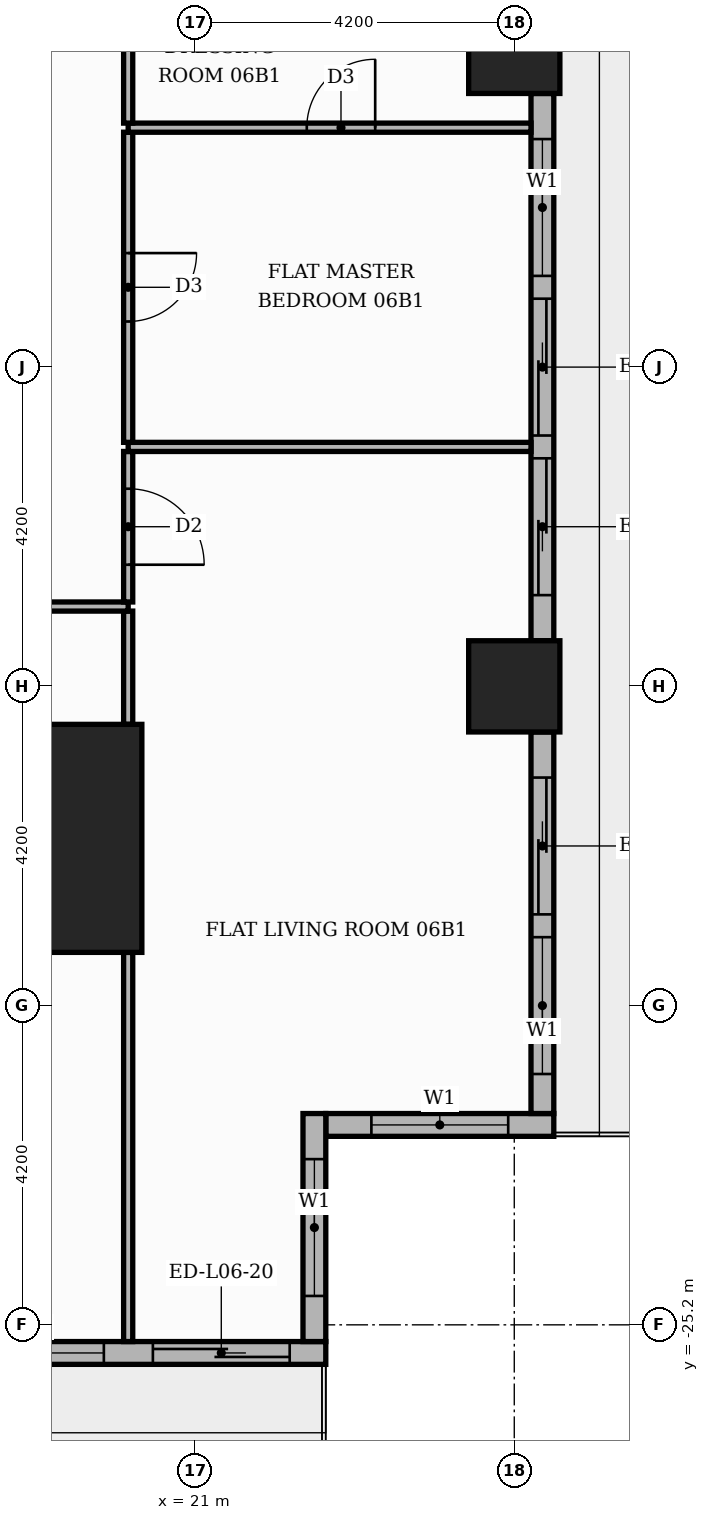
"""IFC4 building model, lengths in metres.
Left out: names, types, materials, properties, quantities, classifications, styles, units other than length and angle.
Written with IfcOpenShell. Run it as: python <this file> out.ifc"""

import sys

from ifc_helpers import new_model, si_unit, direction, frame, frame_2d, origin, origin_2d, place, context, subcontext, project, spatial, rectangle, extrude, element, fill, save


model = new_model("IFC4")
c1 = context("Model", 3, precision=1e-05, world=origin(), true_north=direction((0.0, 1.0)))
c2 = subcontext(c1, "Body", "Model", "MODEL_VIEW")
j1 = project(units=[si_unit("LENGTHUNIT", "METRE"), si_unit("PLANEANGLEUNIT", "RADIAN")], contexts=[c1])
p1 = place(None, origin())
s1 = spatial("IfcSite", under=j1, at=p1, CompositionType="ELEMENT")
p2 = place(p1, origin())
s2 = spatial("IfcBuilding", under=s1, at=p2, CompositionType="ELEMENT")
p3 = place(p2, frame((0.0, 0.0, 30.9)))
s3 = spatial("IfcBuildingStorey", under=s2, at=p3, CompositionType="ELEMENT", Elevation=30.9)
p4 = place(p3, frame((18.8, -18.8, 0.0), z_axis=(0.0, 0.0, 1.0), x_axis=(1.0, 0.0, 0.0)))
e1 = element("IfcColumn", 1, at=p4, inside=s3, PredefinedType="COLUMN", context=c2, shape_type="SweptSolid", body=[
    extrude(rectangle(XDim=3.0, YDim=3.0, at=origin_2d()), origin(), (0.0, 0.0, 1.0), 3.9),
])
for number, where, z_axis, x_axis in (
    (2, (25.2, -8.4, 0.0), (0.0, 0.0, 1.0), (1.0, 0.0, 0.0)),
    (3, (25.2, -16.8, 0.0), (0.0, 0.0, 1.0), (1.0, 0.0, 0.0)),
):
    element("IfcColumn", number, at=place(p3, frame(where, z_axis=z_axis, x_axis=x_axis)), inside=s3, PredefinedType="COLUMN", context=c2, shape_type="SweptSolid", body=[
        extrude(rectangle(XDim=1.2, YDim=1.2, at=origin_2d()), origin(), (0.0, 0.0, 1.0), 3.9),
    ])
p5 = place(p3, frame((22.72, -22.57, 0.0), z_axis=(0.0, 0.0, 1.0), x_axis=(1.0, 0.0, 0.0)))
e4 = element("IfcWall", 4, at=p5, inside=s3, PredefinedType="STANDARD", context=c2, shape_type="SweptSolid", body=[
    extrude(rectangle(XDim=3.0, YDim=0.3, at=frame_2d((1.5, 0.0))), origin(), (0.0, 0.0, 1.0), 3.48),
])
p6 = place(p5, frame((0.6, 0.0, 0.9)))
e5 = element("IfcOpeningElement", 5, at=p6, cuts=e4, PredefinedType="OPENING", context=c2, shape_type="SweptSolid", body=[
    extrude(rectangle(XDim=1.8, YDim=2.1, at=frame_2d((0.9, 1.05))), frame((0.0, 0.16, 0.0), z_axis=(0.0, -1.0, 0.0), x_axis=(1.0, 0.0, 0.0)), (0.0, 0.0, 1.0), 0.32),
])
p7 = place(p3, frame((25.57, -22.42, 0.0), z_axis=(0.0, 0.0, 1.0), x_axis=(0.0, 1.0, 0.0)))
e6 = element("IfcWall", 6, at=p7, inside=s3, PredefinedType="STANDARD", context=c2, shape_type="SweptSolid", body=[
    extrude(rectangle(XDim=5.02, YDim=0.3, at=frame_2d((2.51, 0.0))), origin(), (0.0, 0.0, 1.0), 3.48),
])
p8 = place(p7, frame((0.52, 0.0, 0.9)))
e7 = element("IfcOpeningElement", 7, at=p8, cuts=e6, PredefinedType="OPENING", context=c2, shape_type="SweptSolid", body=[
    extrude(rectangle(XDim=1.8, YDim=2.1, at=frame_2d((0.9, 1.05))), frame((0.0, 0.16, 0.0), z_axis=(0.0, -1.0, 0.0), x_axis=(1.0, 0.0, 0.0)), (0.0, 0.0, 1.0), 0.32),
])
p9 = place(p7, frame((2.62, 0.0, 0.0)))
e8 = element("IfcOpeningElement", 8, at=p9, cuts=e6, PredefinedType="OPENING", context=c2, shape_type="SweptSolid", body=[
    extrude(rectangle(XDim=1.8, YDim=2.4, at=frame_2d((0.9, 1.2))), frame((0.0, 0.16, 0.0), z_axis=(0.0, -1.0, 0.0), x_axis=(1.0, 0.0, 0.0)), (0.0, 0.0, 1.0), 0.32),
])
p10 = place(p3, frame((25.57, -16.2, 0.0), z_axis=(0.0, 0.0, 1.0), x_axis=(0.0, 1.0, 0.0)))
e9 = element("IfcWall", 9, at=p10, inside=s3, PredefinedType="STANDARD", context=c2, shape_type="SweptSolid", body=[
    extrude(rectangle(XDim=7.2, YDim=0.3, at=frame_2d((3.6, 0.0))), origin(), (0.0, 0.0, 1.0), 3.48),
])
p11 = place(p10, frame((0.6, 0.0, 0.0)))
e10 = element("IfcOpeningElement", 10, at=p11, cuts=e9, PredefinedType="OPENING", context=c2, shape_type="SweptSolid", body=[
    extrude(rectangle(XDim=1.8, YDim=2.4, at=frame_2d((0.9, 1.2))), frame((0.0, 0.16, 0.0), z_axis=(0.0, -1.0, 0.0), x_axis=(1.0, 0.0, 0.0)), (0.0, 0.0, 1.0), 0.32),
])
p12 = place(p10, frame((2.7, 0.0, 0.0)))
e11 = element("IfcOpeningElement", 11, at=p12, cuts=e9, PredefinedType="OPENING", context=c2, shape_type="SweptSolid", body=[
    extrude(rectangle(XDim=1.8, YDim=2.4, at=frame_2d((0.9, 1.2))), frame((0.0, 0.16, 0.0), z_axis=(0.0, -1.0, 0.0), x_axis=(1.0, 0.0, 0.0)), (0.0, 0.0, 1.0), 0.32),
])
p13 = place(p10, frame((4.8, 0.0, 0.9)))
e12 = element("IfcOpeningElement", 12, at=p13, cuts=e9, PredefinedType="OPENING", context=c2, shape_type="SweptSolid", body=[
    extrude(rectangle(XDim=1.8, YDim=2.1, at=frame_2d((0.9, 1.05))), frame((0.0, 0.16, 0.0), z_axis=(0.0, -1.0, 0.0), x_axis=(1.0, 0.0, 0.0)), (0.0, 0.0, 1.0), 0.32),
])
p14 = place(p3, frame((17.4, -25.57, 0.0), z_axis=(0.0, 0.0, 1.0), x_axis=(1.0, 0.0, 0.0)))
e13 = element("IfcWall", 13, at=p14, inside=s3, PredefinedType="STANDARD", context=c2, shape_type="SweptSolid", body=[
    extrude(rectangle(XDim=5.32, YDim=0.3, at=frame_2d((2.66, 0.0))), origin(), (0.0, 0.0, 1.0), 3.48),
])
p15 = place(p14, frame((0.6, 0.0, 0.9)))
e14 = element("IfcOpeningElement", 14, at=p15, cuts=e13, PredefinedType="OPENING", context=c2, shape_type="SweptSolid", body=[
    extrude(rectangle(XDim=1.8, YDim=2.1, at=frame_2d((0.9, 1.05))), frame((0.0, 0.16, 0.0), z_axis=(0.0, -1.0, 0.0), x_axis=(1.0, 0.0, 0.0)), (0.0, 0.0, 1.0), 0.32),
])
p16 = place(p14, frame((3.045, 0.0, 0.0)))
e15 = element("IfcOpeningElement", 15, at=p16, cuts=e13, PredefinedType="OPENING", context=c2, shape_type="SweptSolid", body=[
    extrude(rectangle(XDim=1.8, YDim=2.4, at=frame_2d((0.9, 1.2))), frame((0.0, 0.16, 0.0), z_axis=(0.0, -1.0, 0.0), x_axis=(1.0, 0.0, 0.0)), (0.0, 0.0, 1.0), 0.32),
])
p17 = place(p3, frame((22.57, -25.42, 0.0), z_axis=(0.0, 0.0, 1.0), x_axis=(0.0, 1.0, 0.0)))
e16 = element("IfcWall", 16, at=p17, inside=s3, PredefinedType="STANDARD", context=c2, shape_type="SweptSolid", body=[
    extrude(rectangle(XDim=3.0, YDim=0.3, at=frame_2d((1.5, 0.0))), origin(), (0.0, 0.0, 1.0), 3.48),
])
p18 = place(p17, frame((0.6, 0.0, 0.9)))
e17 = element("IfcOpeningElement", 17, at=p18, cuts=e16, PredefinedType="OPENING", context=c2, shape_type="SweptSolid", body=[
    extrude(rectangle(XDim=1.8, YDim=2.1, at=frame_2d((0.9, 1.05))), frame((0.0, 0.16, 0.0), z_axis=(0.0, -1.0, 0.0), x_axis=(1.0, 0.0, 0.0)), (0.0, 0.0, 1.0), 0.32),
])
p19 = place(p3, frame((20.12, -25.42, 0.0), z_axis=(0.0, 0.0, 1.0), x_axis=(0.0, 1.0, 0.0)))
e18 = element("IfcWall", 18, at=p19, inside=s3, PredefinedType="PARTITIONING", context=c2, shape_type="SweptSolid", body=[
    extrude(rectangle(XDim=5.12, YDim=0.12, at=frame_2d((2.56, 0.0))), origin(), (0.0, 0.0, 1.0), 3.48),
])
p20 = place(p3, frame((20.12, -17.3, 0.0), z_axis=(0.0, 0.0, 1.0), x_axis=(0.0, 1.0, 0.0)))
e19 = element("IfcWall", 19, at=p20, inside=s3, PredefinedType="PARTITIONING", context=c2, shape_type="SweptSolid", body=[
    extrude(rectangle(XDim=1.49, YDim=0.12, at=frame_2d((0.745, 0.0))), origin(), (0.0, 0.0, 1.0), 3.48),
])
p21 = place(p3, frame((13.75, -15.75, 0.0), z_axis=(0.0, 0.0, 1.0), x_axis=(1.0, 0.0, 0.0)))
e20 = element("IfcWall", 20, at=p21, inside=s3, PredefinedType="PARTITIONING", context=c2, shape_type="SweptSolid", body=[
    extrude(rectangle(XDim=6.37, YDim=0.12, at=frame_2d((3.185, 0.0))), origin(), (0.0, 0.0, 1.0), 3.48),
])
p22 = place(p21, frame((2.635, 0.0, 0.0)))
e21 = element("IfcOpeningElement", 21, at=p22, cuts=e20, PredefinedType="OPENING", context=c2, shape_type="SweptSolid", body=[
    extrude(rectangle(XDim=1.0, YDim=2.1, at=frame_2d((0.5, 1.05))), frame((0.0, 0.07, 0.0), z_axis=(0.0, -1.0, 0.0), x_axis=(1.0, 0.0, 0.0)), (0.0, 0.0, 1.0), 0.14),
])
p23 = place(p3, frame((20.12, -15.69, 0.0), z_axis=(0.0, 0.0, 1.0), x_axis=(0.0, 1.0, 0.0)))
e22 = element("IfcWall", 22, at=p23, inside=s3, PredefinedType="PARTITIONING", context=c2, shape_type="SweptSolid", body=[
    extrude(rectangle(XDim=1.98, YDim=0.12, at=frame_2d((0.99, 0.0))), origin(), (0.0, 0.0, 1.0), 3.48),
])
p24 = place(p23, frame((0.49, 0.0, 0.0)))
e23 = element("IfcOpeningElement", 23, at=p24, cuts=e22, PredefinedType="OPENING", context=c2, shape_type="SweptSolid", body=[
    extrude(rectangle(XDim=1.0, YDim=2.1, at=frame_2d((0.5, 1.05))), frame((0.0, 0.07, 0.0), z_axis=(0.0, -1.0, 0.0), x_axis=(1.0, 0.0, 0.0)), (0.0, 0.0, 1.0), 0.14),
])
p25 = place(p3, frame((20.12, -13.65, 0.0), z_axis=(0.0, 0.0, 1.0), x_axis=(1.0, 0.0, 0.0)))
e24 = element("IfcWall", 24, at=p25, inside=s3, PredefinedType="PARTITIONING", context=c2, shape_type="SweptSolid", body=[
    extrude(rectangle(XDim=5.3, YDim=0.12, at=frame_2d((2.65, 0.0))), origin(), (0.0, 0.0, 1.0), 3.48),
])
p26 = place(p3, frame((20.12, -13.59, 0.0), z_axis=(0.0, 0.0, 1.0), x_axis=(0.0, 1.0, 0.0)))
e25 = element("IfcWall", 25, at=p26, inside=s3, PredefinedType="PARTITIONING", context=c2, shape_type="SweptSolid", body=[
    extrude(rectangle(XDim=4.08, YDim=0.12, at=frame_2d((2.04, 0.0))), origin(), (0.0, 0.0, 1.0), 3.48),
])
p27 = place(p26, frame((1.59, 0.0, 0.0)))
e26 = element("IfcOpeningElement", 26, at=p27, cuts=e25, PredefinedType="OPENING", context=c2, shape_type="SweptSolid", body=[
    extrude(rectangle(XDim=0.9, YDim=2.1, at=frame_2d((0.45, 1.05))), frame((0.0, 0.07, 0.0), z_axis=(0.0, -1.0, 0.0), x_axis=(1.0, 0.0, 0.0)), (0.0, 0.0, 1.0), 0.14),
])
p28 = place(p3, frame((20.12, -9.45, 0.0), z_axis=(0.0, 0.0, 1.0), x_axis=(1.0, 0.0, 0.0)))
e27 = element("IfcWall", 27, at=p28, inside=s3, PredefinedType="PARTITIONING", context=c2, shape_type="SweptSolid", body=[
    extrude(rectangle(XDim=5.3, YDim=0.12, at=frame_2d((2.65, 0.0))), origin(), (0.0, 0.0, 1.0), 3.48),
])
p29 = place(p28, frame((2.35, 0.0, 0.0)))
e28 = element("IfcOpeningElement", 28, at=p29, cuts=e27, PredefinedType="OPENING", context=c2, shape_type="SweptSolid", body=[
    extrude(rectangle(XDim=0.9, YDim=2.1, at=frame_2d((0.45, 1.05))), frame((0.0, 0.07, 0.0), z_axis=(0.0, -1.0, 0.0), x_axis=(1.0, 0.0, 0.0)), (0.0, 0.0, 1.0), 0.14),
])
p30 = place(p3, frame((20.12, -9.39, 0.0), z_axis=(0.0, 0.0, 1.0), x_axis=(0.0, 1.0, 0.0)))
e29 = element("IfcWall", 29, at=p30, inside=s3, PredefinedType="PARTITIONING", context=c2, shape_type="SweptSolid", body=[
    extrude(rectangle(XDim=1.98, YDim=0.12, at=frame_2d((0.99, 0.0))), origin(), (0.0, 0.0, 1.0), 3.48),
])
p31 = place(p6, origin())
e30 = element("IfcWindow", 30, at=p31, inside=s3, PartitioningType="SINGLE_PANEL", PredefinedType="WINDOW", context=c2, shape_type="SweptSolid", body=[
    extrude(rectangle(XDim=1.8, YDim=2.1, at=frame_2d((0.9, 1.05))), frame((0.0, 0.03, 0.0), z_axis=(0.0, -1.0, 0.0), x_axis=(1.0, 0.0, 0.0)), (0.0, 0.0, 1.0), 0.06),
])
fill(e5, e30)
p32 = place(p8, origin())
e31 = element("IfcWindow", 31, at=p32, inside=s3, PartitioningType="SINGLE_PANEL", PredefinedType="WINDOW", context=c2, shape_type="SweptSolid", body=[
    extrude(rectangle(XDim=1.8, YDim=2.1, at=frame_2d((0.9, 1.05))), frame((0.0, 0.03, 0.0), z_axis=(0.0, -1.0, 0.0), x_axis=(1.0, 0.0, 0.0)), (0.0, 0.0, 1.0), 0.06),
])
fill(e7, e31)
p33 = place(p9, origin())
e32 = element("IfcDoor", 32, at=p33, inside=s3, OperationType="SLIDING_TO_RIGHT", PredefinedType="DOOR", context=c2, shape_type="SweptSolid", body=[
    extrude(rectangle(XDim=1.8, YDim=2.4, at=frame_2d((0.9, 1.2))), frame((0.0, 0.025, 0.0), z_axis=(0.0, -1.0, 0.0), x_axis=(1.0, 0.0, 0.0)), (0.0, 0.0, 1.0), 0.05),
])
fill(e8, e32)
p34 = place(p11, origin())
e33 = element("IfcDoor", 33, at=p34, inside=s3, OperationType="SLIDING_TO_LEFT", PredefinedType="DOOR", context=c2, shape_type="SweptSolid", body=[
    extrude(rectangle(XDim=1.8, YDim=2.4, at=frame_2d((0.9, 1.2))), frame((0.0, 0.025, 0.0), z_axis=(0.0, -1.0, 0.0), x_axis=(1.0, 0.0, 0.0)), (0.0, 0.0, 1.0), 0.05),
])
fill(e10, e33)
p35 = place(p12, origin())
e34 = element("IfcDoor", 34, at=p35, inside=s3, OperationType="SLIDING_TO_RIGHT", PredefinedType="DOOR", context=c2, shape_type="SweptSolid", body=[
    extrude(rectangle(XDim=1.8, YDim=2.4, at=frame_2d((0.9, 1.2))), frame((0.0, 0.025, 0.0), z_axis=(0.0, -1.0, 0.0), x_axis=(1.0, 0.0, 0.0)), (0.0, 0.0, 1.0), 0.05),
])
fill(e11, e34)
p36 = place(p13, origin())
e35 = element("IfcWindow", 35, at=p36, inside=s3, PartitioningType="SINGLE_PANEL", PredefinedType="WINDOW", context=c2, shape_type="SweptSolid", body=[
    extrude(rectangle(XDim=1.8, YDim=2.1, at=frame_2d((0.9, 1.05))), frame((0.0, 0.03, 0.0), z_axis=(0.0, -1.0, 0.0), x_axis=(1.0, 0.0, 0.0)), (0.0, 0.0, 1.0), 0.06),
])
fill(e12, e35)
p37 = place(p15, origin())
e36 = element("IfcWindow", 36, at=p37, inside=s3, PartitioningType="SINGLE_PANEL", PredefinedType="WINDOW", context=c2, shape_type="SweptSolid", body=[
    extrude(rectangle(XDim=1.8, YDim=2.1, at=frame_2d((0.9, 1.05))), frame((0.0, 0.03, 0.0), z_axis=(0.0, -1.0, 0.0), x_axis=(1.0, 0.0, 0.0)), (0.0, 0.0, 1.0), 0.06),
])
fill(e14, e36)
p38 = place(p16, origin())
e37 = element("IfcDoor", 37, at=p38, inside=s3, OperationType="SLIDING_TO_RIGHT", PredefinedType="DOOR", context=c2, shape_type="SweptSolid", body=[
    extrude(rectangle(XDim=1.8, YDim=2.4, at=frame_2d((0.9, 1.2))), frame((0.0, 0.025, 0.0), z_axis=(0.0, -1.0, 0.0), x_axis=(1.0, 0.0, 0.0)), (0.0, 0.0, 1.0), 0.05),
])
fill(e15, e37)
p39 = place(p18, origin())
e38 = element("IfcWindow", 38, at=p39, inside=s3, PartitioningType="SINGLE_PANEL", PredefinedType="WINDOW", context=c2, shape_type="SweptSolid", body=[
    extrude(rectangle(XDim=1.8, YDim=2.1, at=frame_2d((0.9, 1.05))), frame((0.0, 0.03, 0.0), z_axis=(0.0, -1.0, 0.0), x_axis=(1.0, 0.0, 0.0)), (0.0, 0.0, 1.0), 0.06),
])
fill(e17, e38)
p40 = place(p24, frame((1.0, 0.0, 0.0), z_axis=(0.0, 0.0, 1.0), x_axis=(-1.0, 0.0, 0.0)))
e39 = element("IfcDoor", 39, at=p40, inside=s3, OperationType="SINGLE_SWING_LEFT", PredefinedType="DOOR", context=c2, shape_type="SweptSolid", body=[
    extrude(rectangle(XDim=1.0, YDim=2.1, at=frame_2d((0.5, 1.05))), frame((0.0, 0.025, 0.0), z_axis=(0.0, -1.0, 0.0), x_axis=(1.0, 0.0, 0.0)), (0.0, 0.0, 1.0), 0.05),
])
fill(e23, e39)
p41 = place(p27, frame((0.9, 0.0, 0.0), z_axis=(0.0, 0.0, 1.0), x_axis=(-1.0, 0.0, 0.0)))
e40 = element("IfcDoor", 40, at=p41, inside=s3, OperationType="SINGLE_SWING_RIGHT", PredefinedType="DOOR", context=c2, shape_type="SweptSolid", body=[
    extrude(rectangle(XDim=0.9, YDim=2.1, at=frame_2d((0.45, 1.05))), frame((0.0, 0.025, 0.0), z_axis=(0.0, -1.0, 0.0), x_axis=(1.0, 0.0, 0.0)), (0.0, 0.0, 1.0), 0.05),
])
fill(e26, e40)
p42 = place(p29, origin())
e41 = element("IfcDoor", 41, at=p42, inside=s3, OperationType="SINGLE_SWING_RIGHT", PredefinedType="DOOR", context=c2, shape_type="SweptSolid", body=[
    extrude(rectangle(XDim=0.9, YDim=2.1, at=frame_2d((0.45, 1.05))), frame((0.0, 0.025, 0.0), z_axis=(0.0, -1.0, 0.0), x_axis=(1.0, 0.0, 0.0)), (0.0, 0.0, 1.0), 0.05),
])
fill(e28, e41)
save(model, sys.argv[1])
